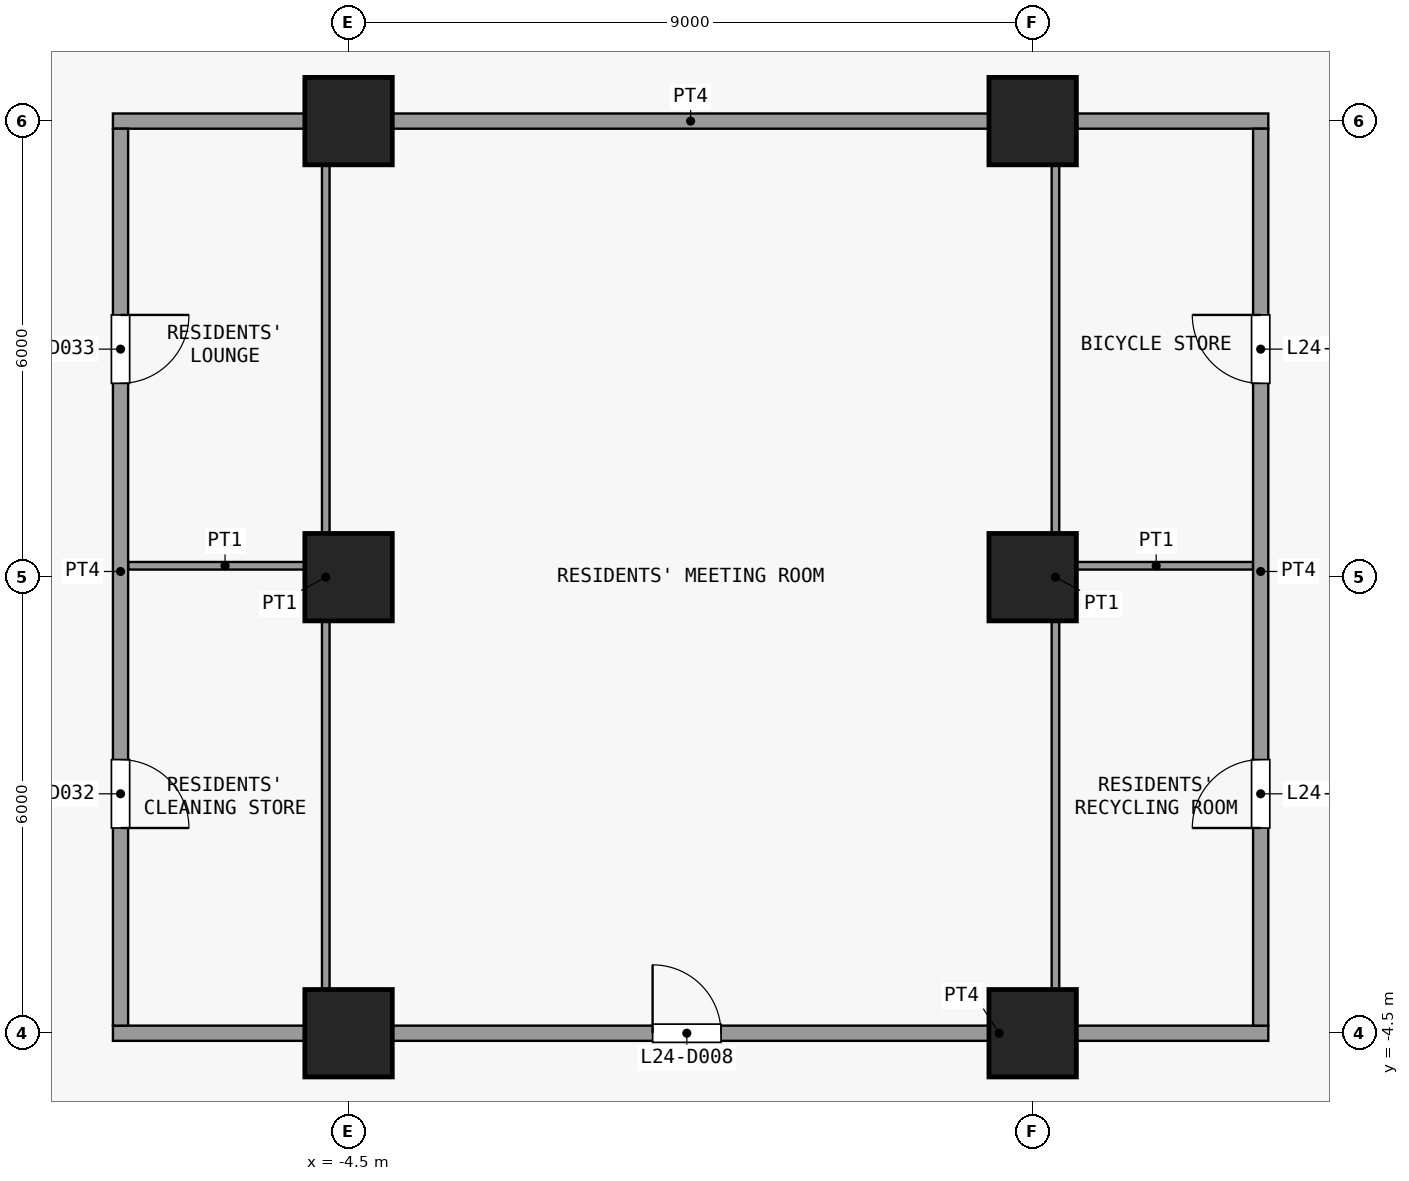
"""IFC4 building model, lengths in metres.
Left out: names, types, materials, properties, quantities, classifications, styles, units other than length and angle.
Written with IfcOpenShell. Run it as: python <this file> out.ifc"""

import sys

from ifc_helpers import new_model, si_unit, direction, frame, frame_2d, origin, origin_2d, place, context, subcontext, project, spatial, rectangle, extrude, element, fill, save


model = new_model("IFC4")
c1 = context("Model", 3, precision=1e-05, world=origin(), true_north=direction((0.0, 1.0)))
c2 = subcontext(c1, "Body", "Model", "MODEL_VIEW")
j1 = project(units=[si_unit("LENGTHUNIT", "METRE"), si_unit("PLANEANGLEUNIT", "RADIAN")], contexts=[c1])
p1 = place(None, origin())
s1 = spatial("IfcSite", under=j1, at=p1, CompositionType="ELEMENT")
p2 = place(p1, origin())
s2 = spatial("IfcBuilding", under=s1, at=p2, CompositionType="ELEMENT")
p3 = place(p2, frame((0.0, 0.0, 99.1)))
s3 = spatial("IfcBuildingStorey", under=s2, at=p3, CompositionType="ELEMENT", Elevation=99.1)
for number, where, z_axis, x_axis in (
    (1, (-4.5, -4.5, 0.0), (0.0, 0.0, 1.0), (1.0, 0.0, 0.0)),
    (2, (-4.5, 1.5, 0.0), (0.0, 0.0, 1.0), (1.0, 0.0, 0.0)),
    (3, (-4.5, 7.5, 0.0), (0.0, 0.0, 1.0), (1.0, 0.0, 0.0)),
    (4, (4.5, -4.5, 0.0), (0.0, 0.0, 1.0), (1.0, 0.0, 0.0)),
    (5, (4.5, 1.5, 0.0), (0.0, 0.0, 1.0), (1.0, 0.0, 0.0)),
    (6, (4.5, 7.5, 0.0), (0.0, 0.0, 1.0), (1.0, 0.0, 0.0)),
):
    element("IfcColumn", number, at=place(p3, frame(where, z_axis=z_axis, x_axis=x_axis)), inside=s3, PredefinedType="COLUMN", context=c2, shape_type="SweptSolid", body=[
        extrude(rectangle(XDim=1.15, YDim=1.15, at=origin_2d()), origin(), (0.0, 0.0, 1.0), 3.6),
    ])
p4 = place(p3, frame((-7.6, -4.5, 0.0), z_axis=(0.0, 0.0, 1.0), x_axis=(1.0, 0.0, 0.0)))
e7 = element("IfcWall", 7, at=p4, inside=s3, PredefinedType="PARTITIONING", context=c2, shape_type="SweptSolid", body=[
    extrude(rectangle(XDim=15.2, YDim=0.2, at=frame_2d((7.6, 0.0))), origin(), (0.0, 0.0, 1.0), 3.3),
])
p5 = place(p4, frame((7.1, 0.0, 0.0)))
e8 = element("IfcOpeningElement", 8, at=p5, cuts=e7, PredefinedType="OPENING", context=c2, shape_type="SweptSolid", body=[
    extrude(rectangle(XDim=0.9, YDim=2.1, at=frame_2d((0.45, 1.05))), frame((0.0, 0.11, 0.0), z_axis=(0.0, -1.0, 0.0), x_axis=(1.0, 0.0, 0.0)), (0.0, 0.0, 1.0), 0.22),
])
for number, where, z_axis, x_axis in (
    (9, (-7.4, 1.65, 0.0), (0.0, 0.0, 1.0), (1.0, 0.0, 0.0)),
    (10, (4.85, 1.65, 0.0), (0.0, 0.0, 1.0), (1.0, 0.0, 0.0)),
):
    element("IfcWall", number, at=place(p3, frame(where, z_axis=z_axis, x_axis=x_axis)), inside=s3, PredefinedType="PARTITIONING", context=c2, shape_type="SweptSolid", body=[
        extrude(rectangle(XDim=2.55, YDim=0.1, at=frame_2d((1.275, 0.0))), origin(), (0.0, 0.0, 1.0), 3.3),
    ])
p6 = place(p3, frame((-7.6, 7.5, 0.0), z_axis=(0.0, 0.0, 1.0), x_axis=(1.0, 0.0, 0.0)))
e11 = element("IfcWall", 11, at=p6, inside=s3, PredefinedType="PARTITIONING", context=c2, shape_type="SweptSolid", body=[
    extrude(rectangle(XDim=15.2, YDim=0.2, at=frame_2d((7.6, 0.0))), origin(), (0.0, 0.0, 1.0), 3.3),
])
p7 = place(p3, frame((-7.5, -4.4, 0.0), z_axis=(0.0, 0.0, 1.0), x_axis=(0.0, 1.0, 0.0)))
e12 = element("IfcWall", 12, at=p7, inside=s3, PredefinedType="PARTITIONING", context=c2, shape_type="SweptSolid", body=[
    extrude(rectangle(XDim=11.8, YDim=0.2, at=frame_2d((5.9, 0.0))), origin(), (0.0, 0.0, 1.0), 3.3),
])
p8 = place(p7, frame((2.6, 0.0, 0.0)))
e13 = element("IfcOpeningElement", 13, at=p8, cuts=e12, PredefinedType="OPENING", context=c2, shape_type="SweptSolid", body=[
    extrude(rectangle(XDim=0.9, YDim=2.1, at=frame_2d((0.45, 1.05))), frame((0.0, 0.11, 0.0), z_axis=(0.0, -1.0, 0.0), x_axis=(1.0, 0.0, 0.0)), (0.0, 0.0, 1.0), 0.22),
])
p9 = place(p7, frame((8.45, 0.0, 0.0)))
e14 = element("IfcOpeningElement", 14, at=p9, cuts=e12, PredefinedType="OPENING", context=c2, shape_type="SweptSolid", body=[
    extrude(rectangle(XDim=0.9, YDim=2.1, at=frame_2d((0.45, 1.05))), frame((0.0, 0.11, 0.0), z_axis=(0.0, -1.0, 0.0), x_axis=(1.0, 0.0, 0.0)), (0.0, 0.0, 1.0), 0.22),
])
for number, where, z_axis, x_axis in (
    (15, (-4.8, -4.4, 0.0), (0.0, 0.0, 1.0), (0.0, 1.0, 0.0)),
    (16, (4.8, -4.4, 0.0), (0.0, 0.0, 1.0), (0.0, 1.0, 0.0)),
):
    element("IfcWall", number, at=place(p3, frame(where, z_axis=z_axis, x_axis=x_axis)), inside=s3, PredefinedType="PARTITIONING", context=c2, shape_type="SweptSolid", body=[
        extrude(rectangle(XDim=11.8, YDim=0.1, at=frame_2d((5.9, 0.0))), origin(), (0.0, 0.0, 1.0), 3.3),
    ])
p10 = place(p3, frame((7.5, -4.4, 0.0), z_axis=(0.0, 0.0, 1.0), x_axis=(0.0, 1.0, 0.0)))
e17 = element("IfcWall", 17, at=p10, inside=s3, PredefinedType="PARTITIONING", context=c2, shape_type="SweptSolid", body=[
    extrude(rectangle(XDim=11.8, YDim=0.2, at=frame_2d((5.9, 0.0))), origin(), (0.0, 0.0, 1.0), 3.3),
])
p11 = place(p10, frame((2.6, 0.0, 0.0)))
e18 = element("IfcOpeningElement", 18, at=p11, cuts=e17, PredefinedType="OPENING", context=c2, shape_type="SweptSolid", body=[
    extrude(rectangle(XDim=0.9, YDim=2.1, at=frame_2d((0.45, 1.05))), frame((0.0, 0.11, 0.0), z_axis=(0.0, -1.0, 0.0), x_axis=(1.0, 0.0, 0.0)), (0.0, 0.0, 1.0), 0.22),
])
p12 = place(p10, frame((8.45, 0.0, 0.0)))
e19 = element("IfcOpeningElement", 19, at=p12, cuts=e17, PredefinedType="OPENING", context=c2, shape_type="SweptSolid", body=[
    extrude(rectangle(XDim=0.9, YDim=2.1, at=frame_2d((0.45, 1.05))), frame((0.0, 0.11, 0.0), z_axis=(0.0, -1.0, 0.0), x_axis=(1.0, 0.0, 0.0)), (0.0, 0.0, 1.0), 0.22),
])
p13 = place(p5, origin())
e20 = element("IfcDoor", 20, at=p13, inside=s3, OperationType="SINGLE_SWING_RIGHT", PredefinedType="DOOR", context=c2, shape_type="SweptSolid", body=[
    extrude(rectangle(XDim=0.9, YDim=2.1, at=frame_2d((0.45, 1.05))), frame((0.0, 0.025, 0.0), z_axis=(0.0, -1.0, 0.0), x_axis=(1.0, 0.0, 0.0)), (0.0, 0.0, 1.0), 0.05),
])
fill(e8, e20)
p14 = place(p8, origin())
e21 = element("IfcDoor", 21, at=p14, inside=s3, OperationType="SINGLE_SWING_LEFT", PredefinedType="DOOR", context=c2, shape_type="SweptSolid", body=[
    extrude(rectangle(XDim=0.9, YDim=2.1, at=frame_2d((0.45, 1.05))), frame((0.0, 0.025, 0.0), z_axis=(0.0, -1.0, 0.0), x_axis=(1.0, 0.0, 0.0)), (0.0, 0.0, 1.0), 0.05),
])
fill(e13, e21)
p15 = place(p9, origin())
e22 = element("IfcDoor", 22, at=p15, inside=s3, OperationType="SINGLE_SWING_RIGHT", PredefinedType="DOOR", context=c2, shape_type="SweptSolid", body=[
    extrude(rectangle(XDim=0.9, YDim=2.1, at=frame_2d((0.45, 1.05))), frame((0.0, 0.025, 0.0), z_axis=(0.0, -1.0, 0.0), x_axis=(1.0, 0.0, 0.0)), (0.0, 0.0, 1.0), 0.05),
])
fill(e14, e22)
p16 = place(p11, origin())
e23 = element("IfcDoor", 23, at=p16, inside=s3, OperationType="SINGLE_SWING_RIGHT", PredefinedType="DOOR", context=c2, shape_type="SweptSolid", body=[
    extrude(rectangle(XDim=0.9, YDim=2.1, at=frame_2d((0.45, 1.05))), frame((0.0, 0.025, 0.0), z_axis=(0.0, -1.0, 0.0), x_axis=(1.0, 0.0, 0.0)), (0.0, 0.0, 1.0), 0.05),
])
fill(e18, e23)
p17 = place(p12, origin())
e24 = element("IfcDoor", 24, at=p17, inside=s3, OperationType="SINGLE_SWING_LEFT", PredefinedType="DOOR", context=c2, shape_type="SweptSolid", body=[
    extrude(rectangle(XDim=0.9, YDim=2.1, at=frame_2d((0.45, 1.05))), frame((0.0, 0.025, 0.0), z_axis=(0.0, -1.0, 0.0), x_axis=(1.0, 0.0, 0.0)), (0.0, 0.0, 1.0), 0.05),
])
fill(e19, e24)
save(model, sys.argv[1])
